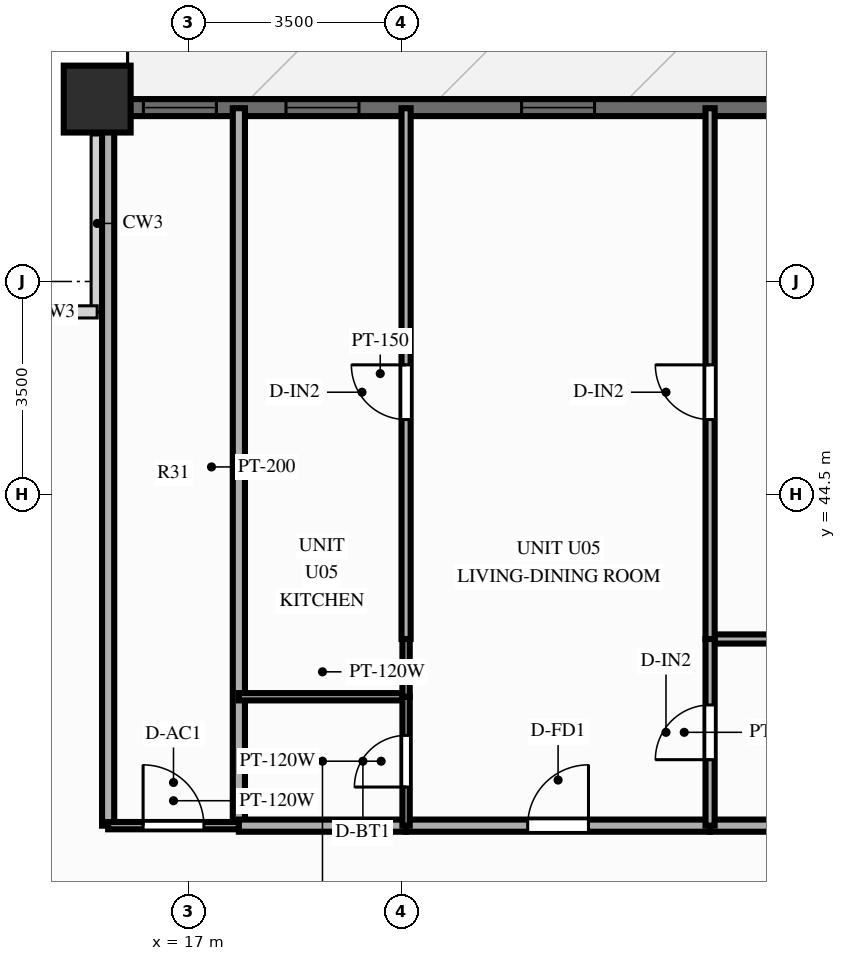
"""IFC4 building model, lengths in metres.
Left out: names, types, materials, properties, quantities, classifications, styles, units other than length and angle.
Written with IfcOpenShell. Run it as: python <this file> out.ifc"""

import sys

from ifc_helpers import new_model, si_unit, direction, frame, frame_2d, origin, origin_2d, place, context, subcontext, project, spatial, rectangle, extrude, source, transform, mapped, element, fill, save


model = new_model("IFC4")
c1 = context("Model", 3, precision=1e-05, world=origin(), true_north=direction((0.0, 1.0)))
c2 = subcontext(c1, "Body", "Model", "MODEL_VIEW")
j1 = project(units=[si_unit("LENGTHUNIT", "METRE"), si_unit("PLANEANGLEUNIT", "RADIAN")], contexts=[c1])
p1 = place(None, origin())
s1 = spatial("IfcSite", under=j1, at=p1, CompositionType="ELEMENT")
p2 = place(p1, origin())
s2 = spatial("IfcBuilding", under=s1, at=p2, CompositionType="ELEMENT")
p3 = place(p2, frame((0.0, 0.0, 43.4)))
s3 = spatial("IfcBuildingStorey", under=s2, at=p3, CompositionType="ELEMENT", Elevation=43.4)
m1 = source(origin(), c2, "Body", "SweptSolid", [
    extrude(rectangle(XDim=1.1, YDim=1.1, at=origin_2d()), origin(), (0.0, 0.0, 1.0), 3.0),
])
p4 = place(p3, frame((15.5, 51.0, 0.0), z_axis=(0.0, 0.0, 1.0), x_axis=(1.0, 0.0, 0.0)))
e1 = element("IfcColumn", 1, at=p4, inside=s3, PredefinedType="COLUMN", context=c2, shape_type="MappedRepresentation", body=[
    mapped(m1, transform((0.0, 0.0, 0.0), scale=1.0)),
])
p5 = place(p3, frame((15.5, 50.86, 0.0), z_axis=(0.0, 0.0, 1.0), x_axis=(1.0, 0.0, 0.0)))
e2 = element("IfcWall", 2, at=p5, inside=s3, PredefinedType="SOLIDWALL", context=c2, shape_type="SweptSolid", body=[
    extrude(rectangle(XDim=45.0, YDim=0.28, at=frame_2d((22.5, 0.0))), origin(), (0.0, 0.0, 1.0), 2.28),
])
p6 = place(p5, frame((0.76, 0.0, 0.25)))
e3 = element("IfcOpeningElement", 3, at=p6, cuts=e2, PredefinedType="OPENING", context=c2, shape_type="SweptSolid", body=[
    extrude(rectangle(XDim=1.2, YDim=1.5, at=frame_2d((0.6, 0.75))), frame((0.0, 0.152, 0.0), z_axis=(0.0, -1.0, 0.0), x_axis=(1.0, 0.0, 0.0)), (0.0, 0.0, 1.0), 0.304),
])
p7 = place(p5, frame((3.105, 0.0, 0.25)))
e4 = element("IfcOpeningElement", 4, at=p7, cuts=e2, PredefinedType="OPENING", context=c2, shape_type="SweptSolid", body=[
    extrude(rectangle(XDim=1.2, YDim=1.5, at=frame_2d((0.6, 0.75))), frame((0.0, 0.152, 0.0), z_axis=(0.0, -1.0, 0.0), x_axis=(1.0, 0.0, 0.0)), (0.0, 0.0, 1.0), 0.304),
])
p8 = place(p5, frame((6.98, 0.0, 0.25)))
e5 = element("IfcOpeningElement", 5, at=p8, cuts=e2, PredefinedType="OPENING", context=c2, shape_type="SweptSolid", body=[
    extrude(rectangle(XDim=1.2, YDim=1.5, at=frame_2d((0.6, 0.75))), frame((0.0, 0.152, 0.0), z_axis=(0.0, -1.0, 0.0), x_axis=(1.0, 0.0, 0.0)), (0.0, 0.0, 1.0), 0.304),
])
p9 = place(p5, frame((11.341, 0.0, 0.25)))
e6 = element("IfcOpeningElement", 6, at=p9, cuts=e2, PredefinedType="OPENING", context=c2, shape_type="SweptSolid", body=[
    extrude(rectangle(XDim=1.2, YDim=1.5, at=frame_2d((0.6, 0.75))), frame((0.0, 0.152, 0.0), z_axis=(0.0, -1.0, 0.0), x_axis=(1.0, 0.0, 0.0)), (0.0, 0.0, 1.0), 0.304),
])
p10 = place(p5, frame((14.231, 0.0, 0.25)))
e7 = element("IfcOpeningElement", 7, at=p10, cuts=e2, PredefinedType="OPENING", context=c2, shape_type="SweptSolid", body=[
    extrude(rectangle(XDim=0.95, YDim=1.5, at=frame_2d((0.475, 0.75))), frame((0.0, 0.152, 0.0), z_axis=(0.0, -1.0, 0.0), x_axis=(1.0, 0.0, 0.0)), (0.0, 0.0, 1.0), 0.304),
])
p11 = place(p5, frame((18.502, 0.0, 0.0)))
e8 = element("IfcOpeningElement", 8, at=p11, cuts=e2, PredefinedType="OPENING", context=c2, shape_type="SweptSolid", body=[
    extrude(rectangle(XDim=1.1, YDim=2.15, at=frame_2d((0.55, 1.075))), frame((0.0, 0.152, 0.0), z_axis=(0.0, -1.0, 0.0), x_axis=(1.0, 0.0, 0.0)), (0.0, 0.0, 1.0), 0.304),
])
p12 = place(p5, frame((22.813, 0.0, 0.25)))
e9 = element("IfcOpeningElement", 9, at=p12, cuts=e2, PredefinedType="OPENING", context=c2, shape_type="SweptSolid", body=[
    extrude(rectangle(XDim=1.2, YDim=1.5, at=frame_2d((0.6, 0.75))), frame((0.0, 0.152, 0.0), z_axis=(0.0, -1.0, 0.0), x_axis=(1.0, 0.0, 0.0)), (0.0, 0.0, 1.0), 0.304),
])
p13 = place(p5, frame((26.05, 0.0, 0.25)))
e10 = element("IfcOpeningElement", 10, at=p13, cuts=e2, PredefinedType="OPENING", context=c2, shape_type="SweptSolid", body=[
    extrude(rectangle(XDim=1.2, YDim=1.5, at=frame_2d((0.6, 0.75))), frame((0.0, 0.152, 0.0), z_axis=(0.0, -1.0, 0.0), x_axis=(1.0, 0.0, 0.0)), (0.0, 0.0, 1.0), 0.304),
])
p14 = place(p5, frame((29.97, 0.0, 0.25)))
e11 = element("IfcOpeningElement", 11, at=p14, cuts=e2, PredefinedType="OPENING", context=c2, shape_type="SweptSolid", body=[
    extrude(rectangle(XDim=1.2, YDim=1.5, at=frame_2d((0.6, 0.75))), frame((0.0, 0.152, 0.0), z_axis=(0.0, -1.0, 0.0), x_axis=(1.0, 0.0, 0.0)), (0.0, 0.0, 1.0), 0.304),
])
p15 = place(p5, frame((33.011, 0.0, 0.25)))
e12 = element("IfcOpeningElement", 12, at=p15, cuts=e2, PredefinedType="OPENING", context=c2, shape_type="SweptSolid", body=[
    extrude(rectangle(XDim=1.2, YDim=1.5, at=frame_2d((0.6, 0.75))), frame((0.0, 0.152, 0.0), z_axis=(0.0, -1.0, 0.0), x_axis=(1.0, 0.0, 0.0)), (0.0, 0.0, 1.0), 0.304),
])
p16 = place(p5, frame((36.181, 0.0, 0.25)))
e13 = element("IfcOpeningElement", 13, at=p16, cuts=e2, PredefinedType="OPENING", context=c2, shape_type="SweptSolid", body=[
    extrude(rectangle(XDim=1.2, YDim=1.5, at=frame_2d((0.6, 0.75))), frame((0.0, 0.152, 0.0), z_axis=(0.0, -1.0, 0.0), x_axis=(1.0, 0.0, 0.0)), (0.0, 0.0, 1.0), 0.304),
])
p17 = place(p5, frame((39.079, 0.0, 0.25)))
e14 = element("IfcOpeningElement", 14, at=p17, cuts=e2, PredefinedType="OPENING", context=c2, shape_type="SweptSolid", body=[
    extrude(rectangle(XDim=1.2, YDim=1.5, at=frame_2d((0.6, 0.75))), frame((0.0, 0.152, 0.0), z_axis=(0.0, -1.0, 0.0), x_axis=(1.0, 0.0, 0.0)), (0.0, 0.0, 1.0), 0.304),
])
p18 = place(p5, frame((42.339, 0.0, 0.25)))
e15 = element("IfcOpeningElement", 15, at=p18, cuts=e2, PredefinedType="OPENING", context=c2, shape_type="SweptSolid", body=[
    extrude(rectangle(XDim=1.2, YDim=1.5, at=frame_2d((0.6, 0.75))), frame((0.0, 0.152, 0.0), z_axis=(0.0, -1.0, 0.0), x_axis=(1.0, 0.0, 0.0)), (0.0, 0.0, 1.0), 0.304),
])
for number, where, z_axis, x_axis in (
    (16, (15.68, 39.05, 0.0), (0.0, 0.0, 1.0), (0.0, 1.0, 0.0)),
    (17, (17.83, 39.05, 0.0), (0.0, 0.0, 1.0), (0.0, 1.0, 0.0)),
):
    element("IfcWall", number, at=place(p3, frame(where, z_axis=z_axis, x_axis=x_axis)), inside=s3, PredefinedType="PARTITIONING", context=c2, shape_type="SweptSolid", body=[
        extrude(rectangle(XDim=11.8, YDim=0.2, at=frame_2d((5.9, 0.0))), origin(), (0.0, 0.0, 1.0), 2.79),
    ])
p19 = place(p3, frame((15.68, 39.05, 0.0), z_axis=(0.0, 0.0, 1.0), x_axis=(1.0, 0.0, 0.0)))
e18 = element("IfcWall", 18, at=p19, inside=s3, PredefinedType="PARTITIONING", context=c2, shape_type="SweptSolid", body=[
    extrude(rectangle(XDim=2.15, YDim=0.12, at=frame_2d((1.075, 0.0))), origin(), (0.0, 0.0, 1.0), 2.79),
])
p20 = place(p19, frame((0.575, 0.0, 0.0)))
e19 = element("IfcOpeningElement", 19, at=p20, cuts=e18, PredefinedType="OPENING", context=c2, shape_type="SweptSolid", body=[
    extrude(rectangle(XDim=1.0, YDim=2.1, at=frame_2d((0.5, 1.05))), frame((0.0, 0.072, 0.0), z_axis=(0.0, -1.0, 0.0), x_axis=(1.0, 0.0, 0.0)), (0.0, 0.0, 1.0), 0.144),
])
p21 = place(p3, frame((17.83, 39.05, 0.0), z_axis=(0.0, 0.0, 1.0), x_axis=(1.0, 0.0, 0.0)))
e20 = element("IfcWall", 20, at=p21, inside=s3, PredefinedType="PARTITIONING", context=c2, shape_type="SweptSolid", body=[
    extrude(rectangle(XDim=2.75, YDim=0.2, at=frame_2d((1.375, 0.0))), origin(), (0.0, 0.0, 1.0), 2.79),
])
p22 = place(p3, frame((20.58, 39.05, 0.0), z_axis=(0.0, 0.0, 1.0), x_axis=(1.0, 0.0, 0.0)))
e21 = element("IfcWall", 21, at=p22, inside=s3, PredefinedType="PARTITIONING", context=c2, shape_type="SweptSolid", body=[
    extrude(rectangle(XDim=5.0, YDim=0.2, at=frame_2d((2.5, 0.0))), origin(), (0.0, 0.0, 1.0), 2.79),
])
p23 = place(p22, frame((2.0, 0.0, 0.0)))
e22 = element("IfcOpeningElement", 22, at=p23, cuts=e21, PredefinedType="OPENING", context=c2, shape_type="SweptSolid", body=[
    extrude(rectangle(XDim=1.0, YDim=2.15, at=frame_2d((0.5, 1.075))), frame((0.0, 0.112, 0.0), z_axis=(0.0, -1.0, 0.0), x_axis=(1.0, 0.0, 0.0)), (0.0, 0.0, 1.0), 0.224),
])
p24 = place(p3, frame((25.58, 39.05, 0.0), z_axis=(0.0, 0.0, 1.0), x_axis=(1.0, 0.0, 0.0)))
e23 = element("IfcWall", 23, at=p24, inside=s3, PredefinedType="PARTITIONING", context=c2, shape_type="SweptSolid", body=[
    extrude(rectangle(XDim=3.723, YDim=0.2, at=frame_2d((1.861, 0.0))), origin(), (0.0, 0.0, 1.0), 2.79),
])
p25 = place(p3, frame((17.83, 41.17, 0.0), z_axis=(0.0, 0.0, 1.0), x_axis=(1.0, 0.0, 0.0)))
e24 = element("IfcWall", 24, at=p25, inside=s3, PredefinedType="PARTITIONING", context=c2, shape_type="SweptSolid", body=[
    extrude(rectangle(XDim=2.75, YDim=0.12, at=frame_2d((1.375, 0.0))), origin(), (0.0, 0.0, 1.0), 2.79),
])
p26 = place(p3, frame((25.58, 42.12, 0.0), z_axis=(0.0, 0.0, 1.0), x_axis=(1.0, 0.0, 0.0)))
e25 = element("IfcWall", 25, at=p26, inside=s3, PredefinedType="PARTITIONING", context=c2, shape_type="SweptSolid", body=[
    extrude(rectangle(XDim=3.723, YDim=0.15, at=frame_2d((1.861, 0.0))), origin(), (0.0, 0.0, 1.0), 2.79),
])
p27 = place(p3, frame((20.58, 39.05, 0.0), z_axis=(0.0, 0.0, 1.0), x_axis=(0.0, 1.0, 0.0)))
e26 = element("IfcWall", 26, at=p27, inside=s3, PredefinedType="PARTITIONING", context=c2, shape_type="SweptSolid", body=[
    extrude(rectangle(XDim=2.12, YDim=0.12, at=frame_2d((1.06, 0.0))), origin(), (0.0, 0.0, 1.0), 2.79),
])
p28 = place(p27, frame((0.635, 0.0, 0.0)))
e27 = element("IfcOpeningElement", 27, at=p28, cuts=e26, PredefinedType="OPENING", context=c2, shape_type="SweptSolid", body=[
    extrude(rectangle(XDim=0.85, YDim=2.05, at=frame_2d((0.425, 1.025))), frame((0.0, 0.072, 0.0), z_axis=(0.0, -1.0, 0.0), x_axis=(1.0, 0.0, 0.0)), (0.0, 0.0, 1.0), 0.144),
])
p29 = place(p3, frame((20.58, 41.17, 0.0), z_axis=(0.0, 0.0, 1.0), x_axis=(0.0, 1.0, 0.0)))
e28 = element("IfcWall", 28, at=p29, inside=s3, PredefinedType="PARTITIONING", context=c2, shape_type="SweptSolid", body=[
    extrude(rectangle(XDim=0.95, YDim=0.12, at=frame_2d((0.475, 0.0))), origin(), (0.0, 0.0, 1.0), 2.79),
])
p30 = place(p3, frame((20.58, 42.12, 0.0), z_axis=(0.0, 0.0, 1.0), x_axis=(0.0, 1.0, 0.0)))
e29 = element("IfcWall", 29, at=p30, inside=s3, PredefinedType="PARTITIONING", context=c2, shape_type="SweptSolid", body=[
    extrude(rectangle(XDim=8.73, YDim=0.15, at=frame_2d((4.365, 0.0))), origin(), (0.0, 0.0, 1.0), 2.79),
])
p31 = place(p30, frame((3.609, 0.0, 0.0)))
e30 = element("IfcOpeningElement", 30, at=p31, cuts=e29, PredefinedType="OPENING", context=c2, shape_type="SweptSolid", body=[
    extrude(rectangle(XDim=0.9, YDim=2.1, at=frame_2d((0.45, 1.05))), frame((0.0, 0.087, 0.0), z_axis=(0.0, -1.0, 0.0), x_axis=(1.0, 0.0, 0.0)), (0.0, 0.0, 1.0), 0.174),
])
p32 = place(p3, frame((25.58, 39.05, 0.0), z_axis=(0.0, 0.0, 1.0), x_axis=(0.0, 1.0, 0.0)))
e31 = element("IfcWall", 31, at=p32, inside=s3, PredefinedType="PARTITIONING", context=c2, shape_type="SweptSolid", body=[
    extrude(rectangle(XDim=3.07, YDim=0.15, at=frame_2d((1.535, 0.0))), origin(), (0.0, 0.0, 1.0), 2.79),
])
p33 = place(p32, frame((1.085, 0.0, 0.0)))
e32 = element("IfcOpeningElement", 32, at=p33, cuts=e31, PredefinedType="OPENING", context=c2, shape_type="SweptSolid", body=[
    extrude(rectangle(XDim=0.9, YDim=2.1, at=frame_2d((0.45, 1.05))), frame((0.0, 0.087, 0.0), z_axis=(0.0, -1.0, 0.0), x_axis=(1.0, 0.0, 0.0)), (0.0, 0.0, 1.0), 0.174),
])
p34 = place(p3, frame((25.58, 42.12, 0.0), z_axis=(0.0, 0.0, 1.0), x_axis=(0.0, 1.0, 0.0)))
e33 = element("IfcWall", 33, at=p34, inside=s3, PredefinedType="PARTITIONING", context=c2, shape_type="SweptSolid", body=[
    extrude(rectangle(XDim=8.73, YDim=0.15, at=frame_2d((4.365, 0.0))), origin(), (0.0, 0.0, 1.0), 2.79),
])
p35 = place(p34, frame((3.609, 0.0, 0.0)))
e34 = element("IfcOpeningElement", 34, at=p35, cuts=e33, PredefinedType="OPENING", context=c2, shape_type="SweptSolid", body=[
    extrude(rectangle(XDim=0.9, YDim=2.1, at=frame_2d((0.45, 1.05))), frame((0.0, 0.087, 0.0), z_axis=(0.0, -1.0, 0.0), x_axis=(1.0, 0.0, 0.0)), (0.0, 0.0, 1.0), 0.174),
])
m2 = source(origin(), c2, "Body", "SweptSolid", [
    extrude(rectangle(XDim=1.2, YDim=1.5, at=frame_2d((0.6, 0.75))), frame((0.0, 0.03, 0.0), z_axis=(0.0, -1.0, 0.0), x_axis=(1.0, 0.0, 0.0)), (0.0, 0.0, 1.0), 0.06),
])
p36 = place(p6, origin())
e35 = element("IfcWindow", 35, at=p36, inside=s3, PartitioningType="SINGLE_PANEL", PredefinedType="WINDOW", context=c2, shape_type="MappedRepresentation", body=[
    mapped(m2, transform((0.0, 0.0, 0.0), scale=1.0)),
])
fill(e3, e35)
p37 = place(p7, origin())
e36 = element("IfcWindow", 36, at=p37, inside=s3, PartitioningType="SINGLE_PANEL", PredefinedType="WINDOW", context=c2, shape_type="MappedRepresentation", body=[
    mapped(m2, transform((0.0, 0.0, 0.0), scale=1.0)),
])
fill(e4, e36)
p38 = place(p8, origin())
e37 = element("IfcWindow", 37, at=p38, inside=s3, PartitioningType="SINGLE_PANEL", PredefinedType="WINDOW", context=c2, shape_type="MappedRepresentation", body=[
    mapped(m2, transform((0.0, 0.0, 0.0), scale=1.0)),
])
fill(e5, e37)
m3 = source(origin(), c2, "Body", "SweptSolid", [
    extrude(rectangle(XDim=1.0, YDim=2.1, at=frame_2d((0.5, 1.05))), frame((0.0, 0.025, 0.0), z_axis=(0.0, -1.0, 0.0), x_axis=(1.0, 0.0, 0.0)), (0.0, 0.0, 1.0), 0.05),
])
p39 = place(p20, origin())
e38 = element("IfcDoor", 38, at=p39, inside=s3, OperationType="SINGLE_SWING_LEFT", PredefinedType="DOOR", context=c2, shape_type="MappedRepresentation", body=[
    mapped(m3, transform((0.0, 0.0, 0.0), scale=1.0)),
])
fill(e19, e38)
m4 = source(origin(), c2, "Body", "SweptSolid", [
    extrude(rectangle(XDim=1.0, YDim=2.15, at=frame_2d((0.5, 1.075))), frame((0.0, 0.025, 0.0), z_axis=(0.0, -1.0, 0.0), x_axis=(1.0, 0.0, 0.0)), (0.0, 0.0, 1.0), 0.05),
])
p40 = place(p23, origin())
e39 = element("IfcDoor", 39, at=p40, inside=s3, OperationType="SINGLE_SWING_RIGHT", PredefinedType="DOOR", context=c2, shape_type="MappedRepresentation", body=[
    mapped(m4, transform((0.0, 0.0, 0.0), scale=1.0)),
])
fill(e22, e39)
m5 = source(origin(), c2, "Body", "SweptSolid", [
    extrude(rectangle(XDim=0.85, YDim=2.05, at=frame_2d((0.425, 1.025))), frame((0.0, 0.025, 0.0), z_axis=(0.0, -1.0, 0.0), x_axis=(1.0, 0.0, 0.0)), (0.0, 0.0, 1.0), 0.05),
])
p41 = place(p28, origin())
e40 = element("IfcDoor", 40, at=p41, inside=s3, OperationType="SINGLE_SWING_LEFT", PredefinedType="DOOR", context=c2, shape_type="MappedRepresentation", body=[
    mapped(m5, transform((0.0, 0.0, 0.0), scale=1.0)),
])
fill(e27, e40)
m6 = source(origin(), c2, "Body", "SweptSolid", [
    extrude(rectangle(XDim=0.9, YDim=2.1, at=frame_2d((0.45, 1.05))), frame((0.0, 0.025, 0.0), z_axis=(0.0, -1.0, 0.0), x_axis=(1.0, 0.0, 0.0)), (0.0, 0.0, 1.0), 0.05),
])
p42 = place(p31, origin())
e41 = element("IfcDoor", 41, at=p42, inside=s3, OperationType="SINGLE_SWING_RIGHT", PredefinedType="DOOR", context=c2, shape_type="MappedRepresentation", body=[
    mapped(m6, transform((0.0, 0.0, 0.0), scale=1.0)),
])
fill(e30, e41)
p43 = place(p33, origin())
e42 = element("IfcDoor", 42, at=p43, inside=s3, OperationType="SINGLE_SWING_LEFT", PredefinedType="DOOR", context=c2, shape_type="MappedRepresentation", body=[
    mapped(m6, transform((0.0, 0.0, 0.0), scale=1.0)),
])
fill(e32, e42)
p44 = place(p35, origin())
e43 = element("IfcDoor", 43, at=p44, inside=s3, OperationType="SINGLE_SWING_RIGHT", PredefinedType="DOOR", context=c2, shape_type="MappedRepresentation", body=[
    mapped(m6, transform((0.0, 0.0, 0.0), scale=1.0)),
])
fill(e34, e43)
save(model, sys.argv[1])
